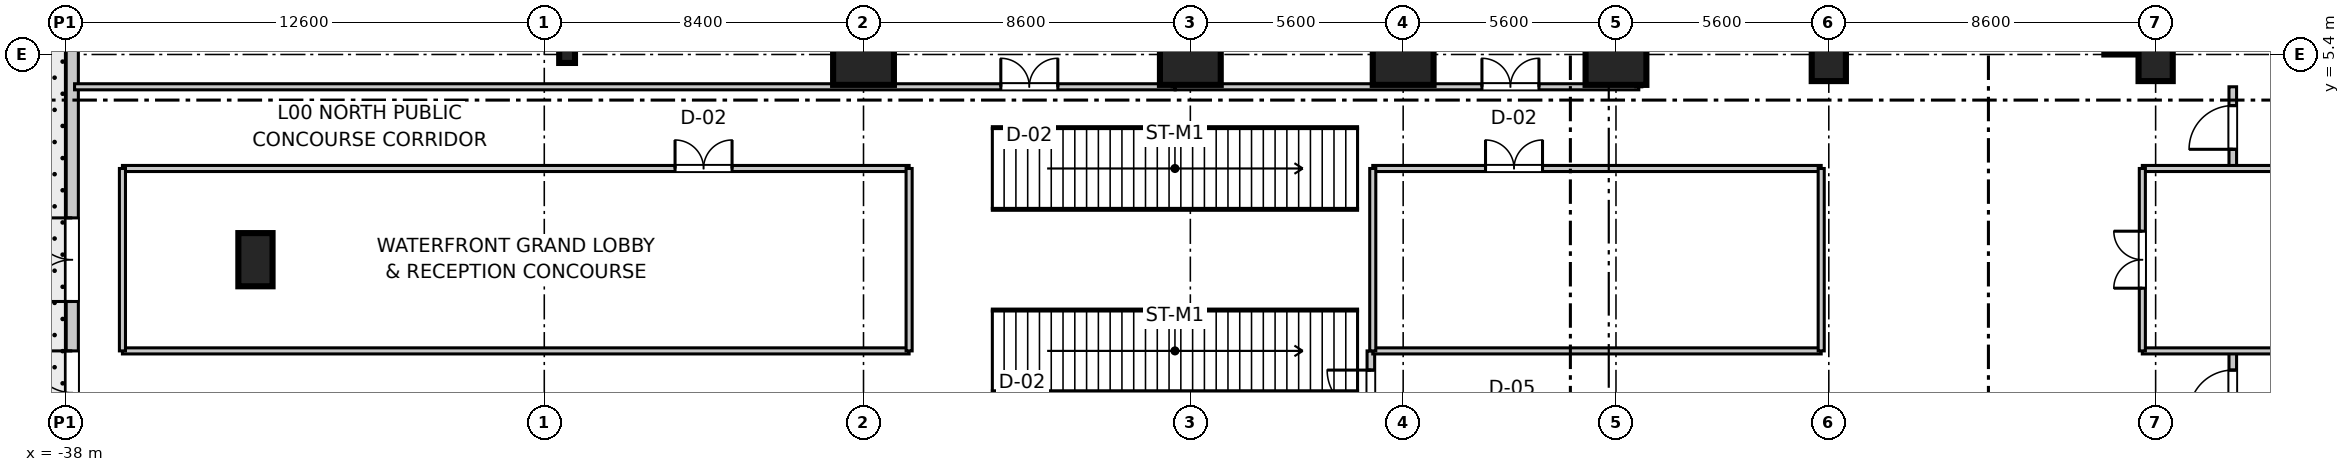
"""IFC4 building model, lengths in metres.
Left out: names, types, materials, properties, quantities, classifications, styles, units other than length and angle.
Written with IfcOpenShell. Run it as: python <this file> out.ifc"""

import sys

from ifc_helpers import new_model, si_unit, direction, frame, frame_2d, origin, origin_2d, place, context, subcontext, project, spatial, rectangle, i_section, extrude, source, transform, mapped, element, fill, save


model = new_model("IFC4")
c1 = context("Model", 3, precision=1e-05, world=origin(), true_north=direction((0.0, 1.0)))
c2 = subcontext(c1, "Body", "Model", "MODEL_VIEW")
j1 = project(units=[si_unit("LENGTHUNIT", "METRE"), si_unit("PLANEANGLEUNIT", "RADIAN")], contexts=[c1])
p1 = place(None, origin())
s1 = spatial("IfcSite", under=j1, at=p1, CompositionType="ELEMENT")
p2 = place(p1, origin())
s2 = spatial("IfcBuilding", under=s1, at=p2, CompositionType="ELEMENT")
p3 = place(p2, origin())
s3 = spatial("IfcBuildingStorey", under=s2, at=p3, CompositionType="ELEMENT", Elevation=0.0)
m1 = source(origin(), c2, "Body", "SweptSolid", [
    extrude(rectangle(XDim=1.6, YDim=1.6, at=origin_2d()), origin(), (0.0, 0.0, 1.0), 5.355),
])
for number, where, z_axis, x_axis in (
    (1, (-17.0, 5.4, 0.0), (0.0, 0.0, 1.0), (1.0, 0.0, 0.0)),
    (2, (-8.4, 5.4, 0.0), (0.0, 0.0, 1.0), (1.0, 0.0, 0.0)),
    (3, (-2.8, 5.4, 0.0), (0.0, 0.0, 1.0), (1.0, 0.0, 0.0)),
    (4, (2.8, 5.4, 0.0), (0.0, 0.0, 1.0), (1.0, 0.0, 0.0)),
):
    element("IfcColumn", number, at=place(p3, frame(where, z_axis=z_axis, x_axis=x_axis)), inside=s3, PredefinedType="COLUMN", context=c2, shape_type="MappedRepresentation", body=[
        mapped(m1, transform((0.0, 0.0, 0.0), scale=1.0)),
    ])
m2 = source(origin(), c2, "Body", "SweptSolid", [
    extrude(rectangle(XDim=0.9, YDim=1.4, at=origin_2d()), origin(), (0.0, 0.0, 1.0), 5.355),
])
for number, where, z_axis, x_axis in (
    (5, (8.4, 5.4, 0.0), (0.0, 0.0, 1.0), (1.0, 0.0, 0.0)),
    (6, (17.0, 5.4, 0.0), (0.0, 0.0, 1.0), (1.0, 0.0, 0.0)),
    (7, (-33.0, 0.0, 0.0), (0.0, 0.0, 1.0), (1.0, 0.0, 0.0)),
):
    element("IfcColumn", number, at=place(p3, frame(where, z_axis=z_axis, x_axis=x_axis)), inside=s3, PredefinedType="PILASTER", context=c2, shape_type="MappedRepresentation", body=[
        mapped(m2, transform((0.0, 0.0, 0.0), scale=1.0)),
    ])
m3 = source(origin(), c2, "Body", "SweptSolid", [
    extrude(i_section(OverallWidth=0.416, OverallDepth=0.446, WebThickness=0.025, FlangeThickness=0.04, at=origin_2d()), origin(), (0.0, 0.0, 1.0), 5.355),
])
p4 = place(p3, frame((-24.8, 5.4, 0.0), z_axis=(0.0, 0.0, 1.0), x_axis=(1.0, 0.0, 0.0)))
e8 = element("IfcColumn", 8, at=p4, inside=s3, PredefinedType="COLUMN", context=c2, shape_type="MappedRepresentation", body=[
    mapped(m3, transform((0.0, 0.0, 0.0), scale=1.0)),
])
m4 = source(origin(), c2, "Body", "SweptSolid", [
    extrude(rectangle(XDim=11.6, YDim=0.8, at=frame_2d((5.8, 0.0))), origin(), (0.0, 0.0, 1.0), 5.08),
])
p5 = place(p3, frame((16.05, 5.4, 0.0), z_axis=(0.0, 0.0, 1.0), x_axis=(0.0, 1.0, 0.0)))
e9 = element("IfcWall", 9, at=p5, inside=s3, PredefinedType="SHEAR", context=c2, shape_type="MappedRepresentation", body=[
    mapped(m4, transform((0.0, 0.0, 0.0), scale=1.0)),
])
m5 = source(origin(), c2, "Body", "SweptSolid", [
    extrude(rectangle(XDim=20.0, YDim=0.32, at=frame_2d((10.0, 0.0))), origin(), (0.0, 0.0, 1.0), 5.08),
])
p6 = place(p3, frame((-37.82, -10.0, 0.0), z_axis=(0.0, 0.0, 1.0), x_axis=(0.0, 1.0, 0.0)))
e10 = element("IfcWall", 10, at=p6, inside=s3, PredefinedType="STANDARD", context=c2, shape_type="MappedRepresentation", body=[
    mapped(m5, transform((0.0, 0.0, 0.0), scale=1.0)),
])
p7 = place(p6, frame((5.4, 0.0, 0.0)))
e11 = element("IfcOpeningElement", 11, at=p7, cuts=e10, PredefinedType="OPENING", context=c2, shape_type="SweptSolid", body=[
    extrude(rectangle(XDim=2.2, YDim=2.6, at=frame_2d((1.1, 1.3))), frame((0.0, 0.17, 0.0), z_axis=(0.0, -1.0, 0.0), x_axis=(1.0, 0.0, 0.0)), (0.0, 0.0, 1.0), 0.34),
])
p8 = place(p6, frame((8.9, 0.0, 0.0)))
e12 = element("IfcOpeningElement", 12, at=p8, cuts=e10, PredefinedType="OPENING", context=c2, shape_type="SweptSolid", body=[
    extrude(rectangle(XDim=2.2, YDim=2.6, at=frame_2d((1.1, 1.3))), frame((0.0, 0.17, 0.0), z_axis=(0.0, -1.0, 0.0), x_axis=(1.0, 0.0, 0.0)), (0.0, 0.0, 1.0), 0.34),
])
p9 = place(p6, frame((1.4, 0.0, 0.9)))
e13 = element("IfcOpeningElement", 13, at=p9, cuts=e10, PredefinedType="OPENING", context=c2, shape_type="SweptSolid", body=[
    extrude(rectangle(XDim=2.4, YDim=2.2, at=frame_2d((1.2, 1.1))), frame((0.0, 0.17, 0.0), z_axis=(0.0, -1.0, 0.0), x_axis=(1.0, 0.0, 0.0)), (0.0, 0.0, 1.0), 0.34),
])
p10 = place(p6, frame((16.0, 0.0, 0.9)))
e14 = element("IfcOpeningElement", 14, at=p10, cuts=e10, PredefinedType="OPENING", context=c2, shape_type="SweptSolid", body=[
    extrude(rectangle(XDim=2.4, YDim=2.2, at=frame_2d((1.2, 1.1))), frame((0.0, 0.17, 0.0), z_axis=(0.0, -1.0, 0.0), x_axis=(1.0, 0.0, 0.0)), (0.0, 0.0, 1.0), 0.34),
])
m6 = source(origin(), c2, "Body", "SweptSolid", [
    extrude(rectangle(XDim=2.15, YDim=0.2, at=frame_2d((1.075, 0.0))), origin(), (0.0, 0.0, 1.0), 3.4),
])
p11 = place(p3, frame((-3.65, -4.55, 0.0), z_axis=(0.0, 0.0, 1.0), x_axis=(0.0, 1.0, 0.0)))
e15 = element("IfcWall", 15, at=p11, inside=s3, PredefinedType="PARTITIONING", context=c2, shape_type="MappedRepresentation", body=[
    mapped(m6, transform((0.0, 0.0, 0.0), scale=1.0)),
])
p12 = place(p11, frame((0.495, 0.0, 0.0)))
e16 = element("IfcOpeningElement", 16, at=p12, cuts=e15, PredefinedType="OPENING", context=c2, shape_type="SweptSolid", body=[
    extrude(rectangle(XDim=1.15, YDim=2.15, at=frame_2d((0.575, 1.075))), frame((0.0, 0.11, 0.0), z_axis=(0.0, -1.0, 0.0), x_axis=(1.0, 0.0, 0.0)), (0.0, 0.0, 1.0), 0.22),
])
p13 = place(p3, frame((19.03, 2.4, 0.0), z_axis=(0.0, 0.0, 1.0), x_axis=(0.0, 1.0, 0.0)))
e17 = element("IfcWall", 17, at=p13, inside=s3, PredefinedType="PARTITIONING", context=c2, shape_type="MappedRepresentation", body=[
    mapped(m6, transform((0.0, 0.0, 0.0), scale=1.0)),
])
p14 = place(p13, frame((0.505, 0.0, 0.0)))
e18 = element("IfcOpeningElement", 18, at=p14, cuts=e17, PredefinedType="OPENING", context=c2, shape_type="SweptSolid", body=[
    extrude(rectangle(XDim=1.15, YDim=2.15, at=frame_2d((0.575, 1.075))), frame((0.0, 0.11, 0.0), z_axis=(0.0, -1.0, 0.0), x_axis=(1.0, 0.0, 0.0)), (0.0, 0.0, 1.0), 0.22),
])
p15 = place(p3, frame((19.03, -4.55, 0.0), z_axis=(0.0, 0.0, 1.0), x_axis=(0.0, 1.0, 0.0)))
e19 = element("IfcWall", 19, at=p15, inside=s3, PredefinedType="PARTITIONING", context=c2, shape_type="MappedRepresentation", body=[
    mapped(m6, transform((0.0, 0.0, 0.0), scale=1.0)),
])
p16 = place(p15, frame((0.495, 0.0, 0.0)))
e20 = element("IfcOpeningElement", 20, at=p16, cuts=e19, PredefinedType="OPENING", context=c2, shape_type="SweptSolid", body=[
    extrude(rectangle(XDim=1.15, YDim=2.15, at=frame_2d((0.575, 1.075))), frame((0.0, 0.11, 0.0), z_axis=(0.0, -1.0, 0.0), x_axis=(1.0, 0.0, 0.0)), (0.0, 0.0, 1.0), 0.22),
])
m7 = source(origin(), c2, "Body", "SweptSolid", [
    extrude(rectangle(XDim=20.7, YDim=0.16, at=frame_2d((10.35, 0.0))), origin(), (0.0, 0.0, 1.0), 3.4),
])
p17 = place(p3, frame((-36.5, -2.4, 0.0), z_axis=(0.0, 0.0, 1.0), x_axis=(1.0, 0.0, 0.0)))
e21 = element("IfcWall", 21, at=p17, inside=s3, PredefinedType="PARTITIONING", context=c2, shape_type="MappedRepresentation", body=[
    mapped(m7, transform((0.0, 0.0, 0.0), scale=1.0)),
])
p18 = place(p3, frame((-36.5, 2.4, 0.0), z_axis=(0.0, 0.0, 1.0), x_axis=(1.0, 0.0, 0.0)))
e22 = element("IfcWall", 22, at=p18, inside=s3, PredefinedType="PARTITIONING", context=c2, shape_type="MappedRepresentation", body=[
    mapped(m7, transform((0.0, 0.0, 0.0), scale=1.0)),
])
p19 = place(p18, frame((14.541, 0.0, 0.0)))
e23 = element("IfcOpeningElement", 23, at=p19, cuts=e22, PredefinedType="OPENING", context=c2, shape_type="SweptSolid", body=[
    extrude(rectangle(XDim=1.5, YDim=2.15, at=frame_2d((0.75, 1.075))), frame((0.0, 0.09, 0.0), z_axis=(0.0, -1.0, 0.0), x_axis=(1.0, 0.0, 0.0)), (0.0, 0.0, 1.0), 0.18),
])
m8 = source(origin(), c2, "Body", "SweptSolid", [
    extrude(rectangle(XDim=4.8, YDim=0.16, at=frame_2d((2.4, 0.0))), origin(), (0.0, 0.0, 1.0), 3.4),
])
for number, where, z_axis, x_axis in (
    (24, (-36.5, -2.4, 0.0), (0.0, 0.0, 1.0), (0.0, 1.0, 0.0)),
    (25, (-15.8, -2.4, 0.0), (0.0, 0.0, 1.0), (0.0, 1.0, 0.0)),
):
    element("IfcWall", number, at=place(p3, frame(where, z_axis=z_axis, x_axis=x_axis)), inside=s3, PredefinedType="PARTITIONING", context=c2, shape_type="MappedRepresentation", body=[
        mapped(m8, transform((0.0, 0.0, 0.0), scale=1.0)),
    ])
m9 = source(origin(), c2, "Body", "SweptSolid", [
    extrude(rectangle(XDim=11.8, YDim=0.16, at=frame_2d((5.9, 0.0))), origin(), (0.0, 0.0, 1.0), 3.4),
])
p20 = place(p3, frame((-3.6, -2.4, 0.0), z_axis=(0.0, 0.0, 1.0), x_axis=(1.0, 0.0, 0.0)))
e26 = element("IfcWall", 26, at=p20, inside=s3, PredefinedType="PARTITIONING", context=c2, shape_type="MappedRepresentation", body=[
    mapped(m9, transform((0.0, 0.0, 0.0), scale=1.0)),
])
p21 = place(p3, frame((-3.6, 2.4, 0.0), z_axis=(0.0, 0.0, 1.0), x_axis=(1.0, 0.0, 0.0)))
e27 = element("IfcWall", 27, at=p21, inside=s3, PredefinedType="PARTITIONING", context=c2, shape_type="MappedRepresentation", body=[
    mapped(m9, transform((0.0, 0.0, 0.0), scale=1.0)),
])
p22 = place(p21, frame((2.967, 0.0, 0.0)))
e28 = element("IfcOpeningElement", 28, at=p22, cuts=e27, PredefinedType="OPENING", context=c2, shape_type="SweptSolid", body=[
    extrude(rectangle(XDim=1.5, YDim=2.15, at=frame_2d((0.75, 1.075))), frame((0.0, 0.09, 0.0), z_axis=(0.0, -1.0, 0.0), x_axis=(1.0, 0.0, 0.0)), (0.0, 0.0, 1.0), 0.18),
])
for number, where, z_axis, x_axis in (
    (29, (-3.6, -2.4, 0.0), (0.0, 0.0, 1.0), (0.0, 1.0, 0.0)),
    (30, (8.2, -2.4, 0.0), (0.0, 0.0, 1.0), (0.0, 1.0, 0.0)),
):
    element("IfcWall", number, at=place(p3, frame(where, z_axis=z_axis, x_axis=x_axis)), inside=s3, PredefinedType="PARTITIONING", context=c2, shape_type="MappedRepresentation", body=[
        mapped(m8, transform((0.0, 0.0, 0.0), scale=1.0)),
    ])
m10 = source(origin(), c2, "Body", "SweptSolid", [
    extrude(rectangle(XDim=20.15, YDim=0.16, at=frame_2d((10.075, 0.0))), origin(), (0.0, 0.0, 1.0), 3.4),
])
for number, where, z_axis, x_axis in (
    (31, (16.65, -2.4, 0.0), (0.0, 0.0, 1.0), (1.0, 0.0, 0.0)),
    (32, (16.65, 2.4, 0.0), (0.0, 0.0, 1.0), (1.0, 0.0, 0.0)),
):
    element("IfcWall", number, at=place(p3, frame(where, z_axis=z_axis, x_axis=x_axis)), inside=s3, PredefinedType="PARTITIONING", context=c2, shape_type="MappedRepresentation", body=[
        mapped(m10, transform((0.0, 0.0, 0.0), scale=1.0)),
    ])
p23 = place(p3, frame((16.65, -2.4, 0.0), z_axis=(0.0, 0.0, 1.0), x_axis=(0.0, 1.0, 0.0)))
e33 = element("IfcWall", 33, at=p23, inside=s3, PredefinedType="PARTITIONING", context=c2, shape_type="MappedRepresentation", body=[
    mapped(m8, transform((0.0, 0.0, 0.0), scale=1.0)),
])
p24 = place(p23, frame((1.65, 0.0, 0.0)))
e34 = element("IfcOpeningElement", 34, at=p24, cuts=e33, PredefinedType="OPENING", context=c2, shape_type="SweptSolid", body=[
    extrude(rectangle(XDim=1.5, YDim=2.15, at=frame_2d((0.75, 1.075))), frame((0.0, 0.09, 0.0), z_axis=(0.0, -1.0, 0.0), x_axis=(1.0, 0.0, 0.0)), (0.0, 0.0, 1.0), 0.18),
])
m11 = source(origin(), c2, "Body", "SweptSolid", [
    extrude(rectangle(XDim=28.96, YDim=0.16, at=frame_2d((14.48, 0.0))), origin(), (0.0, 0.0, 1.0), 3.4),
])
p25 = place(p3, frame((-37.76, 4.55, 0.0), z_axis=(0.0, 0.0, 1.0), x_axis=(1.0, 0.0, 0.0)))
e35 = element("IfcWall", 35, at=p25, inside=s3, PredefinedType="PARTITIONING", context=c2, shape_type="MappedRepresentation", body=[
    mapped(m11, transform((0.0, 0.0, 0.0), scale=1.0)),
])
p26 = place(p25, frame((24.373, 0.0, 0.0)))
e36 = element("IfcOpeningElement", 36, at=p26, cuts=e35, PredefinedType="OPENING", context=c2, shape_type="SweptSolid", body=[
    extrude(rectangle(XDim=1.5, YDim=2.15, at=frame_2d((0.75, 1.075))), frame((0.0, 0.09, 0.0), z_axis=(0.0, -1.0, 0.0), x_axis=(1.0, 0.0, 0.0)), (0.0, 0.0, 1.0), 0.18),
])
m12 = source(origin(), c2, "Body", "SweptSolid", [
    extrude(rectangle(XDim=19.21, YDim=0.16, at=frame_2d((9.605, 0.0))), origin(), (0.0, 0.0, 1.0), 3.4),
])
p27 = place(p3, frame((-8.8, 4.55, 0.0), z_axis=(0.0, 0.0, 1.0), x_axis=(0.0, 1.0, 0.0)))
e37 = element("IfcWall", 37, at=p27, inside=s3, PredefinedType="PARTITIONING", context=c2, shape_type="MappedRepresentation", body=[
    mapped(m12, transform((0.0, 0.0, 0.0), scale=1.0)),
])
m13 = source(origin(), c2, "Body", "SweptSolid", [
    extrude(rectangle(XDim=12.2, YDim=0.16, at=frame_2d((6.1, 0.0))), origin(), (0.0, 0.0, 1.0), 3.4),
])
p28 = place(p3, frame((-8.8, 4.55, 0.0), z_axis=(0.0, 0.0, 1.0), x_axis=(1.0, 0.0, 0.0)))
e38 = element("IfcWall", 38, at=p28, inside=s3, PredefinedType="PARTITIONING", context=c2, shape_type="MappedRepresentation", body=[
    mapped(m13, transform((0.0, 0.0, 0.0), scale=1.0)),
])
p29 = place(p28, frame((8.073, 0.0, 0.0)))
e39 = element("IfcOpeningElement", 39, at=p29, cuts=e38, PredefinedType="OPENING", context=c2, shape_type="SweptSolid", body=[
    extrude(rectangle(XDim=1.5, YDim=2.15, at=frame_2d((0.75, 1.075))), frame((0.0, 0.09, 0.0), z_axis=(0.0, -1.0, 0.0), x_axis=(1.0, 0.0, 0.0)), (0.0, 0.0, 1.0), 0.18),
])
p30 = place(p3, frame((3.4, 4.55, 0.0), z_axis=(0.0, 0.0, 1.0), x_axis=(0.0, 1.0, 0.0)))
e40 = element("IfcWall", 40, at=p30, inside=s3, PredefinedType="PARTITIONING", context=c2, shape_type="MappedRepresentation", body=[
    mapped(m12, transform((0.0, 0.0, 0.0), scale=1.0)),
])
m14 = source(origin(), c2, "Body", "SweptSolid", [
    extrude(rectangle(XDim=2.2, YDim=2.6, at=frame_2d((1.1, 1.3))), frame((0.0, 0.025, 0.0), z_axis=(0.0, -1.0, 0.0), x_axis=(1.0, 0.0, 0.0)), (0.0, 0.0, 1.0), 0.05),
])
p31 = place(p7, origin())
e41 = element("IfcDoor", 41, at=p31, inside=s3, OperationType="DOUBLE_DOOR_SINGLE_SWING", PredefinedType="DOOR", context=c2, shape_type="MappedRepresentation", body=[
    mapped(m14, transform((0.0, 0.0, 0.0), scale=1.0)),
])
fill(e11, e41)
p32 = place(p8, origin())
e42 = element("IfcDoor", 42, at=p32, inside=s3, OperationType="DOUBLE_DOOR_SINGLE_SWING", PredefinedType="DOOR", context=c2, shape_type="MappedRepresentation", body=[
    mapped(m14, transform((0.0, 0.0, 0.0), scale=1.0)),
])
fill(e12, e42)
m15 = source(origin(), c2, "Body", "SweptSolid", [
    extrude(rectangle(XDim=1.15, YDim=2.15, at=frame_2d((0.575, 1.075))), frame((0.0, 0.025, 0.0), z_axis=(0.0, -1.0, 0.0), x_axis=(1.0, 0.0, 0.0)), (0.0, 0.0, 1.0), 0.05),
])
p33 = place(p12, origin())
e43 = element("IfcDoor", 43, at=p33, inside=s3, OperationType="SINGLE_SWING_RIGHT", PredefinedType="DOOR", context=c2, shape_type="MappedRepresentation", body=[
    mapped(m15, transform((0.0, 0.0, 0.0), scale=1.0)),
])
fill(e16, e43)
p34 = place(p14, frame((1.15, 0.0, 0.0), z_axis=(0.0, 0.0, 1.0), x_axis=(-1.0, 0.0, 0.0)))
e44 = element("IfcDoor", 44, at=p34, inside=s3, OperationType="SINGLE_SWING_LEFT", PredefinedType="DOOR", context=c2, shape_type="MappedRepresentation", body=[
    mapped(m15, transform((0.0, 0.0, 0.0), scale=1.0)),
])
fill(e18, e44)
p35 = place(p16, frame((1.15, 0.0, 0.0), z_axis=(0.0, 0.0, 1.0), x_axis=(-1.0, 0.0, 0.0)))
e45 = element("IfcDoor", 45, at=p35, inside=s3, OperationType="SINGLE_SWING_LEFT", PredefinedType="DOOR", context=c2, shape_type="MappedRepresentation", body=[
    mapped(m15, transform((0.0, 0.0, 0.0), scale=1.0)),
])
fill(e20, e45)
m16 = source(origin(), c2, "Body", "SweptSolid", [
    extrude(rectangle(XDim=1.5, YDim=2.15, at=frame_2d((0.75, 1.075))), frame((0.0, 0.025, 0.0), z_axis=(0.0, -1.0, 0.0), x_axis=(1.0, 0.0, 0.0)), (0.0, 0.0, 1.0), 0.05),
])
p36 = place(p19, frame((1.5, 0.0, 0.0), z_axis=(0.0, 0.0, 1.0), x_axis=(-1.0, 0.0, 0.0)))
e46 = element("IfcDoor", 46, at=p36, inside=s3, OperationType="DOUBLE_DOOR_SINGLE_SWING", PredefinedType="DOOR", context=c2, shape_type="MappedRepresentation", body=[
    mapped(m16, transform((0.0, 0.0, 0.0), scale=1.0)),
])
fill(e23, e46)
p37 = place(p22, frame((1.5, 0.0, 0.0), z_axis=(0.0, 0.0, 1.0), x_axis=(-1.0, 0.0, 0.0)))
e47 = element("IfcDoor", 47, at=p37, inside=s3, OperationType="DOUBLE_DOOR_SINGLE_SWING", PredefinedType="DOOR", context=c2, shape_type="MappedRepresentation", body=[
    mapped(m16, transform((0.0, 0.0, 0.0), scale=1.0)),
])
fill(e28, e47)
p38 = place(p24, frame((1.5, 0.0, 0.0), z_axis=(0.0, 0.0, 1.0), x_axis=(-1.0, 0.0, 0.0)))
e48 = element("IfcDoor", 48, at=p38, inside=s3, OperationType="DOUBLE_DOOR_SINGLE_SWING", PredefinedType="DOOR", context=c2, shape_type="MappedRepresentation", body=[
    mapped(m16, transform((0.0, 0.0, 0.0), scale=1.0)),
])
fill(e34, e48)
p39 = place(p26, origin())
e49 = element("IfcDoor", 49, at=p39, inside=s3, OperationType="DOUBLE_DOOR_SINGLE_SWING", PredefinedType="DOOR", context=c2, shape_type="MappedRepresentation", body=[
    mapped(m16, transform((0.0, 0.0, 0.0), scale=1.0)),
])
fill(e36, e49)
p40 = place(p29, origin())
e50 = element("IfcDoor", 50, at=p40, inside=s3, OperationType="DOUBLE_DOOR_SINGLE_SWING", PredefinedType="DOOR", context=c2, shape_type="MappedRepresentation", body=[
    mapped(m16, transform((0.0, 0.0, 0.0), scale=1.0)),
])
fill(e39, e50)
save(model, sys.argv[1])
